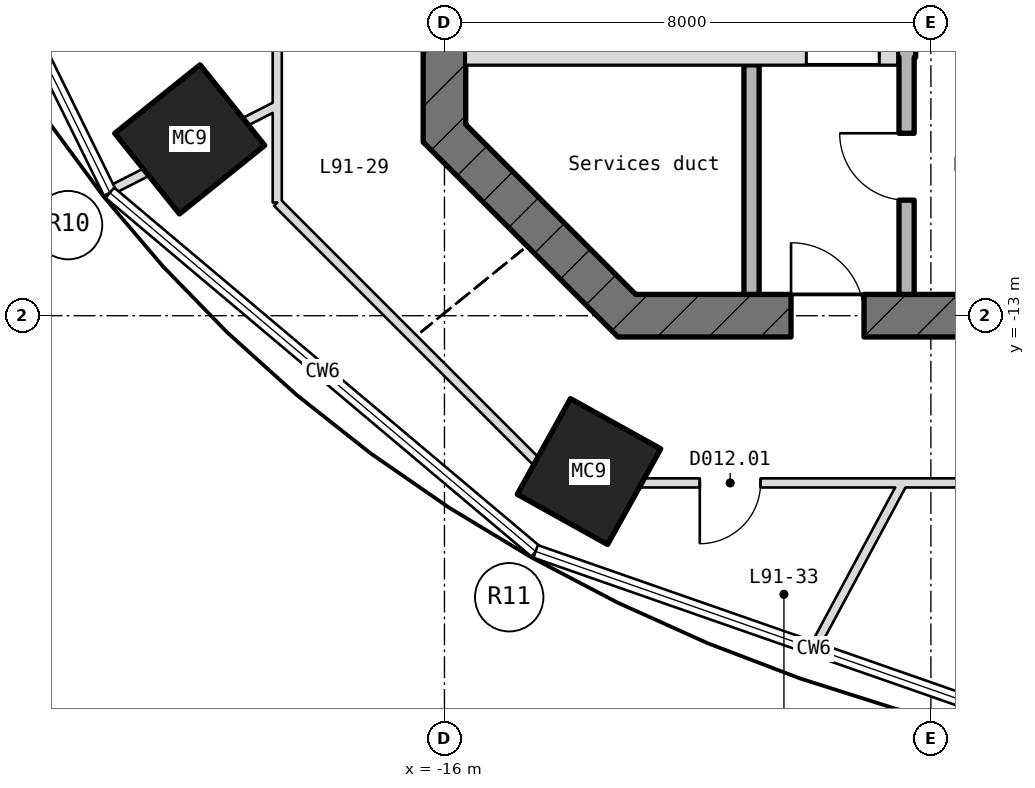
"""IFC4 building model, lengths in metres.
Left out: names, types, materials, properties, quantities, classifications, styles, units other than length and angle.
Written with IfcOpenShell. Run it as: python <this file> out.ifc"""

import sys

from ifc_helpers import new_model, si_unit, direction, frame, frame_2d, origin, origin_2d, place, context, subcontext, project, spatial, rectangle, hollow_rectangle, extrude, element, fill, save


model = new_model("IFC4")
c1 = context("Model", 3, precision=1e-05, world=origin(), true_north=direction((0.0, 1.0)))
c2 = subcontext(c1, "Body", "Model", "MODEL_VIEW")
j1 = project(units=[si_unit("LENGTHUNIT", "METRE"), si_unit("PLANEANGLEUNIT", "RADIAN")], contexts=[c1])
p1 = place(None, origin())
s1 = spatial("IfcSite", under=j1, at=p1, CompositionType="ELEMENT")
p2 = place(p1, origin())
s2 = spatial("IfcBuilding", under=s1, at=p2, CompositionType="ELEMENT")
p3 = place(p2, frame((0.0, 0.0, 401.95)))
s3 = spatial("IfcBuildingStorey", under=s2, at=p3, CompositionType="ELEMENT", Elevation=401.95)
for number, where, z_axis, x_axis in (
    (1, (-20.189, -10.1, -0.25), (0.0, 0.0, 1.0), (-0.626, 0.78, 0.0)),
    (2, (-13.623, -15.563, -0.25), (0.0, 0.0, 1.0), (-0.874, 0.486, 0.0)),
):
    element("IfcColumn", number, at=place(p3, frame(where, z_axis=z_axis, x_axis=x_axis)), inside=s3, PredefinedType="COLUMN", context=c2, shape_type="SweptSolid", body=[
        extrude(hollow_rectangle(XDim=1.7, YDim=1.8, WallThickness=0.05, at=origin_2d()), origin(), (0.0, 0.0, 1.0), 5.55),
    ])
p4 = place(p3, frame((-16.0, 10.145, -0.25), z_axis=(0.0, 0.0, 1.0), x_axis=(0.0, -1.0, 0.0)))
e3 = element("IfcWall", 3, at=p4, inside=s3, PredefinedType="SHEAR", context=c2, shape_type="SweptSolid", body=[
    extrude(rectangle(XDim=20.29, YDim=0.7, at=frame_2d((10.145, 0.0))), origin(), (0.0, 0.0, 1.0), 5.55),
])
p5 = place(p4, frame((8.945, 0.0, 0.25)))
e4 = element("IfcOpeningElement", 4, at=p5, cuts=e3, PredefinedType="OPENING", context=c2, shape_type="SweptSolid", body=[
    extrude(rectangle(XDim=2.4, YDim=2.1, at=frame_2d((1.2, 1.05))), frame((0.0, 0.36, 0.0), z_axis=(0.0, -1.0, 0.0), x_axis=(1.0, 0.0, 0.0)), (0.0, 0.0, 1.0), 0.72),
])
p6 = place(p4, frame((5.545, 0.0, 0.25)))
e5 = element("IfcOpeningElement", 5, at=p6, cuts=e3, PredefinedType="OPENING", context=c2, shape_type="SweptSolid", body=[
    extrude(rectangle(XDim=1.2, YDim=2.1, at=frame_2d((0.6, 1.05))), frame((0.0, 0.36, 0.0), z_axis=(0.0, -1.0, 0.0), x_axis=(1.0, 0.0, 0.0)), (0.0, 0.0, 1.0), 0.72),
])
p7 = place(p3, frame((-16.103, -9.897, -0.25), z_axis=(0.0, 0.0, 1.0), x_axis=(0.707106781187, -0.707106781187, 0.0)))
e6 = element("IfcWall", 6, at=p7, inside=s3, PredefinedType="SHEAR", context=c2, shape_type="SweptSolid", body=[
    extrude(rectangle(XDim=4.533, YDim=0.7, at=frame_2d((2.266, 0.0))), origin(), (0.0, 0.0, 1.0), 5.55),
])
p8 = place(p3, frame((-13.145, -13.0, -0.25), z_axis=(0.0, 0.0, 1.0), x_axis=(1.0, 0.0, 0.0)))
e7 = element("IfcWall", 7, at=p8, inside=s3, PredefinedType="SHEAR", context=c2, shape_type="SweptSolid", body=[
    extrude(rectangle(XDim=26.29, YDim=0.7, at=frame_2d((13.145, 0.0))), origin(), (0.0, 0.0, 1.0), 5.55),
])
p9 = place(p8, frame((2.845, 0.0, 0.25)))
e8 = element("IfcOpeningElement", 8, at=p9, cuts=e7, PredefinedType="OPENING", context=c2, shape_type="SweptSolid", body=[
    extrude(rectangle(XDim=1.2, YDim=2.1, at=frame_2d((0.6, 1.05))), frame((0.0, 0.36, 0.0), z_axis=(0.0, -1.0, 0.0), x_axis=(1.0, 0.0, 0.0)), (0.0, 0.0, 1.0), 0.72),
])
p10 = place(p8, frame((6.845, 0.0, 0.25)))
e9 = element("IfcOpeningElement", 9, at=p10, cuts=e7, PredefinedType="OPENING", context=c2, shape_type="SweptSolid", body=[
    extrude(rectangle(XDim=1.4, YDim=2.1, at=frame_2d((0.7, 1.05))), frame((0.0, 0.36, 0.0), z_axis=(0.0, -1.0, 0.0), x_axis=(1.0, 0.0, 0.0)), (0.0, 0.0, 1.0), 0.72),
])
p11 = place(p8, frame((15.445, 0.0, 0.25)))
e10 = element("IfcOpeningElement", 10, at=p11, cuts=e7, PredefinedType="OPENING", context=c2, shape_type="SweptSolid", body=[
    extrude(rectangle(XDim=1.4, YDim=2.1, at=frame_2d((0.7, 1.05))), frame((0.0, 0.36, 0.0), z_axis=(0.0, -1.0, 0.0), x_axis=(1.0, 0.0, 0.0)), (0.0, 0.0, 1.0), 0.72),
])
p12 = place(p3, frame((-15.65, -8.75, -0.25), z_axis=(0.0, 0.0, 1.0), x_axis=(1.0, 0.0, 0.0)))
e11 = element("IfcWall", 11, at=p12, inside=s3, PredefinedType="SHEAR", context=c2, shape_type="SweptSolid", body=[
    extrude(rectangle(XDim=7.1, YDim=0.25, at=frame_2d((3.55, 0.0))), origin(), (0.0, 0.0, 1.0), 5.55),
])
p13 = place(p12, frame((5.6, 0.0, 0.25)))
e12 = element("IfcOpeningElement", 12, at=p13, cuts=e11, PredefinedType="OPENING", context=c2, shape_type="SweptSolid", body=[
    extrude(rectangle(XDim=1.2, YDim=2.1, at=frame_2d((0.6, 1.05))), frame((0.0, 0.135, 0.0), z_axis=(0.0, -1.0, 0.0), x_axis=(1.0, 0.0, 0.0)), (0.0, 0.0, 1.0), 0.27),
])
p14 = place(p3, frame((-10.95, -12.65, 0.0), z_axis=(0.0, 0.0, 1.0), x_axis=(0.0, 1.0, 0.0)))
e13 = element("IfcWall", 13, at=p14, inside=s3, PredefinedType="STANDARD", context=c2, shape_type="SweptSolid", body=[
    extrude(rectangle(XDim=3.775, YDim=0.25, at=frame_2d((1.887, 0.0))), origin(), (0.0, 0.0, 1.0), 5.3),
])
p15 = place(p3, frame((-8.4, -12.65, 0.0), z_axis=(0.0, 0.0, 1.0), x_axis=(0.0, 1.0, 0.0)))
e14 = element("IfcWall", 14, at=p15, inside=s3, PredefinedType="STANDARD", context=c2, shape_type="SweptSolid", body=[
    extrude(rectangle(XDim=3.9, YDim=0.25, at=frame_2d((1.95, 0.0))), origin(), (0.0, 0.0, 1.0), 5.3),
])
p16 = place(p15, frame((1.55, 0.0, 0.0)))
e15 = element("IfcOpeningElement", 15, at=p16, cuts=e14, PredefinedType="OPENING", context=c2, shape_type="SweptSolid", body=[
    extrude(rectangle(XDim=1.1, YDim=2.1, at=frame_2d((0.55, 1.05))), frame((0.0, 0.135, 0.0), z_axis=(0.0, -1.0, 0.0), x_axis=(1.0, 0.0, 0.0)), (0.0, 0.0, 1.0), 0.27),
])
p17 = place(p3, frame((-8.4, -8.75, -0.25), z_axis=(0.0, 0.0, 1.0), x_axis=(0.0, 1.0, 0.0)))
e16 = element("IfcWall", 16, at=p17, inside=s3, PredefinedType="SHEAR", context=c2, shape_type="SweptSolid", body=[
    extrude(rectangle(XDim=6.25, YDim=0.3, at=frame_2d((3.125, 0.0))), origin(), (0.0, 0.0, 1.0), 5.55),
])
p18 = place(p3, frame((-14.139, -15.75, 0.0), z_axis=(0.0, 0.0, 1.0), x_axis=(1.0, 0.0, 0.0)))
e17 = element("IfcWall", 17, at=p18, inside=s3, PredefinedType="PARTITIONING", context=c2, shape_type="SweptSolid", body=[
    extrude(rectangle(XDim=28.278, YDim=0.15, at=frame_2d((14.139, 0.0))), origin(), (0.0, 0.0, 1.0), 5.3),
])
p19 = place(p18, frame((2.338, 0.0, 0.0)))
e18 = element("IfcOpeningElement", 18, at=p19, cuts=e17, PredefinedType="OPENING", context=c2, shape_type="SweptSolid", body=[
    extrude(rectangle(XDim=1.0, YDim=2.1, at=frame_2d((0.5, 1.05))), frame((0.0, 0.085, 0.0), z_axis=(0.0, -1.0, 0.0), x_axis=(1.0, 0.0, 0.0)), (0.0, 0.0, 1.0), 0.17),
])
p20 = place(p18, frame((9.251, 0.0, 0.0)))
e19 = element("IfcOpeningElement", 19, at=p20, cuts=e17, PredefinedType="OPENING", context=c2, shape_type="SweptSolid", body=[
    extrude(rectangle(XDim=1.0, YDim=2.1, at=frame_2d((0.5, 1.05))), frame((0.0, 0.085, 0.0), z_axis=(0.0, -1.0, 0.0), x_axis=(1.0, 0.0, 0.0)), (0.0, 0.0, 1.0), 0.17),
])
p21 = place(p18, frame((15.306, 0.0, 0.0)))
e20 = element("IfcOpeningElement", 20, at=p21, cuts=e17, PredefinedType="OPENING", context=c2, shape_type="SweptSolid", body=[
    extrude(rectangle(XDim=0.9, YDim=2.1, at=frame_2d((0.45, 1.05))), frame((0.0, 0.085, 0.0), z_axis=(0.0, -1.0, 0.0), x_axis=(1.0, 0.0, 0.0)), (0.0, 0.0, 1.0), 0.17),
])
p22 = place(p18, frame((21.789, 0.0, 0.0)))
e21 = element("IfcOpeningElement", 21, at=p22, cuts=e17, PredefinedType="OPENING", context=c2, shape_type="SweptSolid", body=[
    extrude(rectangle(XDim=1.0, YDim=2.1, at=frame_2d((0.5, 1.05))), frame((0.0, 0.085, 0.0), z_axis=(0.0, -1.0, 0.0), x_axis=(1.0, 0.0, 0.0)), (0.0, 0.0, 1.0), 0.17),
])
p23 = place(p3, frame((-21.498, -10.942, 0.0), z_axis=(0.0, 0.0, 1.0), x_axis=(0.891199467995, 0.453611627106, 0.0)))
e22 = element("IfcWall", 22, at=p23, inside=s3, PredefinedType="PARTITIONING", context=c2, shape_type="SweptSolid", body=[
    extrude(rectangle(XDim=2.468, YDim=0.15, at=frame_2d((1.234, 0.0))), origin(), (0.0, 0.0, 1.0), 5.3),
])
p24 = place(p3, frame((-19.298, -9.823, 0.0), z_axis=(0.0, 0.0, 1.0), x_axis=(0.891230195432, 0.453551252617, 0.0)))
e23 = element("IfcWall", 23, at=p24, inside=s3, PredefinedType="PARTITIONING", context=c2, shape_type="SweptSolid", body=[
    extrude(rectangle(XDim=0.615, YDim=0.15, at=frame_2d((0.308, 0.0))), origin(), (0.0, 0.0, 1.0), 4.459),
])
p25 = place(p3, frame((-9.916, -18.455, 0.0), z_axis=(0.0, 0.0, 1.0), x_axis=(0.473288897356, 0.880907270738, 0.0)))
e24 = element("IfcWall", 24, at=p25, inside=s3, PredefinedType="PARTITIONING", context=c2, shape_type="SweptSolid", body=[
    extrude(rectangle(XDim=3.071, YDim=0.15, at=frame_2d((1.535, 0.0))), origin(), (0.0, 0.0, 1.0), 5.3),
])
p26 = place(p3, frame((-18.75, -11.139, 0.0), z_axis=(0.0, 0.0, 1.0), x_axis=(0.0, 1.0, 0.0)))
e25 = element("IfcWall", 25, at=p26, inside=s3, PredefinedType="PARTITIONING", context=c2, shape_type="SweptSolid", body=[
    extrude(rectangle(XDim=22.278, YDim=0.15, at=frame_2d((11.139, 0.0))), origin(), (0.0, 0.0, 1.0), 5.3),
])
p27 = place(p26, frame((19.785, 0.0, 0.0)))
e26 = element("IfcOpeningElement", 26, at=p27, cuts=e25, PredefinedType="OPENING", context=c2, shape_type="SweptSolid", body=[
    extrude(rectangle(XDim=1.0, YDim=2.1, at=frame_2d((0.5, 1.05))), frame((0.0, 0.085, 0.0), z_axis=(0.0, -1.0, 0.0), x_axis=(1.0, 0.0, 0.0)), (0.0, 0.0, 1.0), 0.17),
])
p28 = place(p26, frame((13.014, 0.0, 0.0)))
e27 = element("IfcOpeningElement", 27, at=p28, cuts=e25, PredefinedType="OPENING", context=c2, shape_type="SweptSolid", body=[
    extrude(rectangle(XDim=1.0, YDim=2.1, at=frame_2d((0.5, 1.05))), frame((0.0, 0.085, 0.0), z_axis=(0.0, -1.0, 0.0), x_axis=(1.0, 0.0, 0.0)), (0.0, 0.0, 1.0), 0.17),
])
p29 = place(p26, frame((6.633, 0.0, 0.0)))
e28 = element("IfcOpeningElement", 28, at=p29, cuts=e25, PredefinedType="OPENING", context=c2, shape_type="SweptSolid", body=[
    extrude(rectangle(XDim=0.9, YDim=2.1, at=frame_2d((0.45, 1.05))), frame((0.0, 0.085, 0.0), z_axis=(0.0, -1.0, 0.0), x_axis=(1.0, 0.0, 0.0)), (0.0, 0.0, 1.0), 0.17),
])
p30 = place(p26, frame((3.013, 0.0, 0.0)))
e29 = element("IfcOpeningElement", 29, at=p30, cuts=e25, PredefinedType="OPENING", context=c2, shape_type="SweptSolid", body=[
    extrude(rectangle(XDim=1.0, YDim=2.1, at=frame_2d((0.5, 1.05))), frame((0.0, 0.085, 0.0), z_axis=(0.0, -1.0, 0.0), x_axis=(1.0, 0.0, 0.0)), (0.0, 0.0, 1.0), 0.17),
])
p31 = place(p3, frame((-14.139, -15.75, 0.0), z_axis=(0.0, 0.0, 1.0), x_axis=(-0.707106781187, 0.707106781187, 0.0)))
e30 = element("IfcWall", 30, at=p31, inside=s3, PredefinedType="PARTITIONING", context=c2, shape_type="SweptSolid", body=[
    extrude(rectangle(XDim=6.521, YDim=0.15, at=frame_2d((3.26, 0.0))), origin(), (0.0, 0.0, 1.0), 5.3),
])
p32 = place(p13, origin())
e31 = element("IfcDoor", 31, at=p32, inside=s3, OperationType="SINGLE_SWING_RIGHT", PredefinedType="DOOR", context=c2, shape_type="SweptSolid", body=[
    extrude(rectangle(XDim=1.2, YDim=2.1, at=frame_2d((0.6, 1.05))), frame((0.0, 0.025, 0.0), z_axis=(0.0, -1.0, 0.0), x_axis=(1.0, 0.0, 0.0)), (0.0, 0.0, 1.0), 0.05),
])
fill(e12, e31)
p33 = place(p16, origin())
e32 = element("IfcDoor", 32, at=p33, inside=s3, OperationType="SINGLE_SWING_RIGHT", PredefinedType="DOOR", context=c2, shape_type="SweptSolid", body=[
    extrude(rectangle(XDim=1.1, YDim=2.1, at=frame_2d((0.55, 1.05))), frame((0.0, 0.025, 0.0), z_axis=(0.0, -1.0, 0.0), x_axis=(1.0, 0.0, 0.0)), (0.0, 0.0, 1.0), 0.05),
])
fill(e15, e32)
p34 = place(p9, origin())
e33 = element("IfcDoor", 33, at=p34, inside=s3, OperationType="SINGLE_SWING_RIGHT", PredefinedType="DOOR", context=c2, shape_type="SweptSolid", body=[
    extrude(rectangle(XDim=1.2, YDim=2.1, at=frame_2d((0.6, 1.05))), frame((0.0, 0.025, 0.0), z_axis=(0.0, -1.0, 0.0), x_axis=(1.0, 0.0, 0.0)), (0.0, 0.0, 1.0), 0.05),
])
fill(e8, e33)
p35 = place(p19, frame((1.0, 0.0, 0.0), z_axis=(0.0, 0.0, 1.0), x_axis=(-1.0, 0.0, 0.0)))
e34 = element("IfcDoor", 34, at=p35, inside=s3, OperationType="SINGLE_SWING_LEFT", PredefinedType="DOOR", context=c2, shape_type="SweptSolid", body=[
    extrude(rectangle(XDim=1.0, YDim=2.1, at=frame_2d((0.5, 1.05))), frame((0.0, 0.025, 0.0), z_axis=(0.0, -1.0, 0.0), x_axis=(1.0, 0.0, 0.0)), (0.0, 0.0, 1.0), 0.05),
])
fill(e18, e34)
save(model, sys.argv[1])
